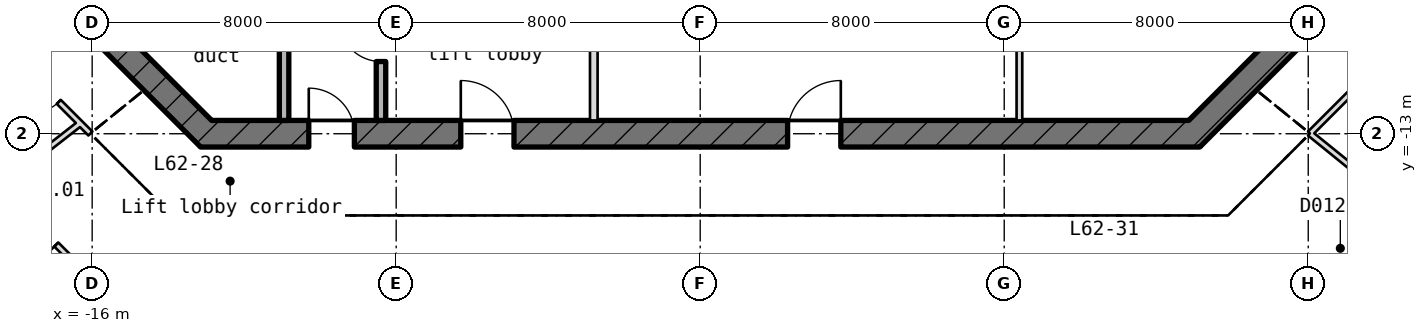
"""IFC4 building model, lengths in metres.
Left out: names, types, materials, properties, quantities, classifications, styles, units other than length and angle.
Written with IfcOpenShell. Run it as: python <this file> out.ifc"""

import sys

from ifc_helpers import new_model, si_unit, direction, frame, frame_2d, origin, place, context, subcontext, project, spatial, rectangle, extrude, element, fill, save


model = new_model("IFC4")
c1 = context("Model", 3, precision=1e-05, world=origin(), true_north=direction((0.0, 1.0)))
c2 = subcontext(c1, "Body", "Model", "MODEL_VIEW")
j1 = project(units=[si_unit("LENGTHUNIT", "METRE"), si_unit("PLANEANGLEUNIT", "RADIAN")], contexts=[c1])
p1 = place(None, origin())
s1 = spatial("IfcSite", under=j1, at=p1, CompositionType="ELEMENT")
p2 = place(p1, origin())
s2 = spatial("IfcBuilding", under=s1, at=p2, CompositionType="ELEMENT")
p3 = place(p2, frame((0.0, 0.0, 279.1)))
s3 = spatial("IfcBuildingStorey", under=s2, at=p3, CompositionType="ELEMENT", Elevation=279.1)
for number, where, z_axis, x_axis in (
    (1, (12.897, -13.103, -0.25), (0.0, 0.0, 1.0), (0.707, 0.707, 0.0)),
    (2, (-16.103, -9.897, -0.25), (0.0, 0.0, 1.0), (0.707, -0.707, 0.0)),
):
    element("IfcWall", number, at=place(p3, frame(where, z_axis=z_axis, x_axis=x_axis)), inside=s3, PredefinedType="SHEAR", context=c2, shape_type="SweptSolid", body=[
        extrude(rectangle(XDim=4.533, YDim=0.7, at=frame_2d((2.266, 0.0))), origin(), (0.0, 0.0, 1.0), 5.47),
    ])
p4 = place(p3, frame((-13.145, -13.0, -0.25), z_axis=(0.0, 0.0, 1.0), x_axis=(1.0, 0.0, 0.0)))
e3 = element("IfcWall", 3, at=p4, inside=s3, PredefinedType="SHEAR", context=c2, shape_type="SweptSolid", body=[
    extrude(rectangle(XDim=26.29, YDim=0.7, at=frame_2d((13.145, 0.0))), origin(), (0.0, 0.0, 1.0), 5.47),
])
p5 = place(p4, frame((2.845, 0.0, 0.25)))
e4 = element("IfcOpeningElement", 4, at=p5, cuts=e3, PredefinedType="OPENING", context=c2, shape_type="SweptSolid", body=[
    extrude(rectangle(XDim=1.2, YDim=2.1, at=frame_2d((0.6, 1.05))), frame((0.0, 0.36, 0.0), z_axis=(0.0, -1.0, 0.0), x_axis=(1.0, 0.0, 0.0)), (0.0, 0.0, 1.0), 0.72),
])
p6 = place(p4, frame((6.845, 0.0, 0.25)))
e5 = element("IfcOpeningElement", 5, at=p6, cuts=e3, PredefinedType="OPENING", context=c2, shape_type="SweptSolid", body=[
    extrude(rectangle(XDim=1.4, YDim=2.1, at=frame_2d((0.7, 1.05))), frame((0.0, 0.36, 0.0), z_axis=(0.0, -1.0, 0.0), x_axis=(1.0, 0.0, 0.0)), (0.0, 0.0, 1.0), 0.72),
])
p7 = place(p4, frame((15.445, 0.0, 0.25)))
e6 = element("IfcOpeningElement", 6, at=p7, cuts=e3, PredefinedType="OPENING", context=c2, shape_type="SweptSolid", body=[
    extrude(rectangle(XDim=1.4, YDim=2.1, at=frame_2d((0.7, 1.05))), frame((0.0, 0.36, 0.0), z_axis=(0.0, -1.0, 0.0), x_axis=(1.0, 0.0, 0.0)), (0.0, 0.0, 1.0), 0.72),
])
p8 = place(p3, frame((-10.95, -12.65, 0.0), z_axis=(0.0, 0.0, 1.0), x_axis=(0.0, 1.0, 0.0)))
e7 = element("IfcWall", 7, at=p8, inside=s3, PredefinedType="STANDARD", context=c2, shape_type="SweptSolid", body=[
    extrude(rectangle(XDim=3.775, YDim=0.25, at=frame_2d((1.887, 0.0))), origin(), (0.0, 0.0, 1.0), 5.22),
])
p9 = place(p3, frame((-8.4, -12.65, 0.0), z_axis=(0.0, 0.0, 1.0), x_axis=(0.0, 1.0, 0.0)))
e8 = element("IfcWall", 8, at=p9, inside=s3, PredefinedType="STANDARD", context=c2, shape_type="SweptSolid", body=[
    extrude(rectangle(XDim=3.9, YDim=0.25, at=frame_2d((1.95, 0.0))), origin(), (0.0, 0.0, 1.0), 5.22),
])
p10 = place(p9, frame((1.55, 0.0, 0.0)))
e9 = element("IfcOpeningElement", 9, at=p10, cuts=e8, PredefinedType="OPENING", context=c2, shape_type="SweptSolid", body=[
    extrude(rectangle(XDim=1.1, YDim=2.1, at=frame_2d((0.55, 1.05))), frame((0.0, 0.135, 0.0), z_axis=(0.0, -1.0, 0.0), x_axis=(1.0, 0.0, 0.0)), (0.0, 0.0, 1.0), 0.27),
])
p11 = place(p3, frame((-2.8, -12.65, 0.0), z_axis=(0.0, 0.0, 1.0), x_axis=(0.0, 1.0, 0.0)))
e10 = element("IfcWall", 10, at=p11, inside=s3, PredefinedType="PARTITIONING", context=c2, shape_type="SweptSolid", body=[
    extrude(rectangle(XDim=4.19, YDim=0.2, at=frame_2d((2.095, 0.0))), origin(), (0.0, 0.0, 1.0), 5.22),
])
p12 = place(p3, frame((8.4, -12.65, 0.0), z_axis=(0.0, 0.0, 1.0), x_axis=(0.0, 1.0, 0.0)))
e11 = element("IfcWall", 11, at=p12, inside=s3, PredefinedType="PARTITIONING", context=c2, shape_type="SweptSolid", body=[
    extrude(rectangle(XDim=4.3, YDim=0.15, at=frame_2d((2.15, 0.0))), origin(), (0.0, 0.0, 1.0), 5.22),
])
p13 = place(p3, frame((-18.46, -14.399, 0.0), z_axis=(0.0, 0.0, 1.0), x_axis=(0.788462265821, 0.615083128834, 0.0)))
e12 = element("IfcWall", 12, at=p13, inside=s3, PredefinedType="PARTITIONING", context=c2, shape_type="SweptSolid", body=[
    extrude(rectangle(XDim=2.72, YDim=0.15, at=frame_2d((1.36, 0.0))), origin(), (0.0, 0.0, 1.0), 5.22),
])
p14 = place(p3, frame((15.551, -17.308, 0.0), z_axis=(0.0, 0.0, 1.0), x_axis=(0.707106781187, 0.707106781187, 0.0)))
e13 = element("IfcWall", 13, at=p14, inside=s3, PredefinedType="PARTITIONING", context=c2, shape_type="SweptSolid", body=[
    extrude(rectangle(XDim=2.428, YDim=0.15, at=frame_2d((1.214, 0.0))), origin(), (0.0, 0.0, 1.0), 4.758),
])
p15 = place(p14, frame((1.328, 0.0, 0.0)))
e14 = element("IfcOpeningElement", 14, at=p15, cuts=e13, PredefinedType="OPENING", context=c2, shape_type="SweptSolid", body=[
    extrude(rectangle(XDim=1.0, YDim=2.1, at=frame_2d((0.5, 1.05))), frame((0.0, 0.085, 0.0), z_axis=(0.0, -1.0, 0.0), x_axis=(1.0, 0.0, 0.0)), (0.0, 0.0, 1.0), 0.17),
])
p16 = place(p3, frame((16.046, -12.994, 0.0), z_axis=(0.0, 0.0, 1.0), x_axis=(0.707106781187, 0.707106781187, 0.0)))
e15 = element("IfcWall", 15, at=p16, inside=s3, PredefinedType="PARTITIONING", context=c2, shape_type="SweptSolid", body=[
    extrude(rectangle(XDim=2.975, YDim=0.15, at=frame_2d((1.487, 0.0))), origin(), (0.0, 0.0, 1.0), 5.22),
])
p17 = place(p3, frame((-16.046, -12.994, 0.0), z_axis=(0.0, 0.0, 1.0), x_axis=(-0.707106781187, 0.707106781187, 0.0)))
e16 = element("IfcWall", 16, at=p17, inside=s3, PredefinedType="PARTITIONING", context=c2, shape_type="SweptSolid", body=[
    extrude(rectangle(XDim=2.975, YDim=0.15, at=frame_2d((1.487, 0.0))), origin(), (0.0, 0.0, 1.0), 5.22),
])
p18 = place(p17, frame((1.177, 0.0, 0.0)))
e17 = element("IfcOpeningElement", 17, at=p18, cuts=e16, PredefinedType="OPENING", context=c2, shape_type="SweptSolid", body=[
    extrude(rectangle(XDim=1.0, YDim=2.1, at=frame_2d((0.5, 1.05))), frame((0.0, 0.085, 0.0), z_axis=(0.0, -1.0, 0.0), x_axis=(1.0, 0.0, 0.0)), (0.0, 0.0, 1.0), 0.17),
])
p19 = place(p3, frame((19.658, -15.919, 0.0), z_axis=(0.0, 0.0, 1.0), x_axis=(-0.777148316215, 0.629317483155, 0.0)))
e18 = element("IfcWall", 18, at=p19, inside=s3, PredefinedType="PARTITIONING", context=c2, shape_type="SweptSolid", body=[
    extrude(rectangle(XDim=4.652, YDim=0.15, at=frame_2d((2.326, 0.0))), origin(), (0.0, 0.0, 1.0), 5.22),
])
p20 = place(p3, frame((-16.066, -16.793, 0.0), z_axis=(0.0, 0.0, 1.0), x_axis=(-0.707070734655, 0.70714282588, 0.0)))
e19 = element("IfcWall", 19, at=p20, inside=s3, PredefinedType="PARTITIONING", context=c2, shape_type="SweptSolid", body=[
    extrude(rectangle(XDim=3.386, YDim=0.15, at=frame_2d((1.693, 0.0))), origin(), (0.0, 0.0, 1.0), 5.22),
])
p21 = place(p20, frame((1.243, 0.0, 0.0)))
e20 = element("IfcOpeningElement", 20, at=p21, cuts=e19, PredefinedType="OPENING", context=c2, shape_type="SweptSolid", body=[
    extrude(rectangle(XDim=0.9, YDim=2.1, at=frame_2d((0.45, 1.05))), frame((0.0, 0.085, 0.0), z_axis=(0.0, -1.0, 0.0), x_axis=(1.0, 0.0, 0.0)), (0.0, 0.0, 1.0), 0.17),
])
p22 = place(p10, origin())
e21 = element("IfcDoor", 21, at=p22, inside=s3, OperationType="SINGLE_SWING_RIGHT", PredefinedType="DOOR", context=c2, shape_type="SweptSolid", body=[
    extrude(rectangle(XDim=1.1, YDim=2.1, at=frame_2d((0.55, 1.05))), frame((0.0, 0.025, 0.0), z_axis=(0.0, -1.0, 0.0), x_axis=(1.0, 0.0, 0.0)), (0.0, 0.0, 1.0), 0.05),
])
fill(e9, e21)
p23 = place(p5, origin())
e22 = element("IfcDoor", 22, at=p23, inside=s3, OperationType="SINGLE_SWING_RIGHT", PredefinedType="DOOR", context=c2, shape_type="SweptSolid", body=[
    extrude(rectangle(XDim=1.2, YDim=2.1, at=frame_2d((0.6, 1.05))), frame((0.0, 0.025, 0.0), z_axis=(0.0, -1.0, 0.0), x_axis=(1.0, 0.0, 0.0)), (0.0, 0.0, 1.0), 0.05),
])
fill(e4, e22)
p24 = place(p6, origin())
e23 = element("IfcDoor", 23, at=p24, inside=s3, OperationType="SINGLE_SWING_RIGHT", PredefinedType="DOOR", context=c2, shape_type="SweptSolid", body=[
    extrude(rectangle(XDim=1.4, YDim=2.1, at=frame_2d((0.7, 1.05))), frame((0.0, 0.025, 0.0), z_axis=(0.0, -1.0, 0.0), x_axis=(1.0, 0.0, 0.0)), (0.0, 0.0, 1.0), 0.05),
])
fill(e5, e23)
p25 = place(p7, origin())
e24 = element("IfcDoor", 24, at=p25, inside=s3, OperationType="SINGLE_SWING_RIGHT", PredefinedType="DOOR", context=c2, shape_type="SweptSolid", body=[
    extrude(rectangle(XDim=1.4, YDim=2.1, at=frame_2d((0.7, 1.05))), frame((0.0, 0.025, 0.0), z_axis=(0.0, -1.0, 0.0), x_axis=(1.0, 0.0, 0.0)), (0.0, 0.0, 1.0), 0.05),
])
fill(e6, e24)
p26 = place(p18, origin())
e25 = element("IfcDoor", 25, at=p26, inside=s3, OperationType="SINGLE_SWING_RIGHT", PredefinedType="DOOR", context=c2, shape_type="SweptSolid", body=[
    extrude(rectangle(XDim=1.0, YDim=2.1, at=frame_2d((0.5, 1.05))), frame((0.0, 0.025, 0.0), z_axis=(0.0, -1.0, 0.0), x_axis=(1.0, 0.0, 0.0)), (0.0, 0.0, 1.0), 0.05),
])
fill(e17, e25)
p27 = place(p21, origin())
e26 = element("IfcDoor", 26, at=p27, inside=s3, OperationType="SINGLE_SWING_RIGHT", PredefinedType="DOOR", context=c2, shape_type="SweptSolid", body=[
    extrude(rectangle(XDim=0.9, YDim=2.1, at=frame_2d((0.45, 1.05))), frame((0.0, 0.025, 0.0), z_axis=(0.0, -1.0, 0.0), x_axis=(1.0, 0.0, 0.0)), (0.0, 0.0, 1.0), 0.05),
])
fill(e20, e26)
p28 = place(p15, frame((1.0, 0.0, 0.0), z_axis=(0.0, 0.0, 1.0), x_axis=(-1.0, 0.0, 0.0)))
e27 = element("IfcDoor", 27, at=p28, inside=s3, OperationType="SINGLE_SWING_LEFT", PredefinedType="DOOR", context=c2, shape_type="SweptSolid", body=[
    extrude(rectangle(XDim=1.0, YDim=2.1, at=frame_2d((0.5, 1.05))), frame((0.0, 0.025, 0.0), z_axis=(0.0, -1.0, 0.0), x_axis=(1.0, 0.0, 0.0)), (0.0, 0.0, 1.0), 0.05),
])
fill(e14, e27)
save(model, sys.argv[1])
